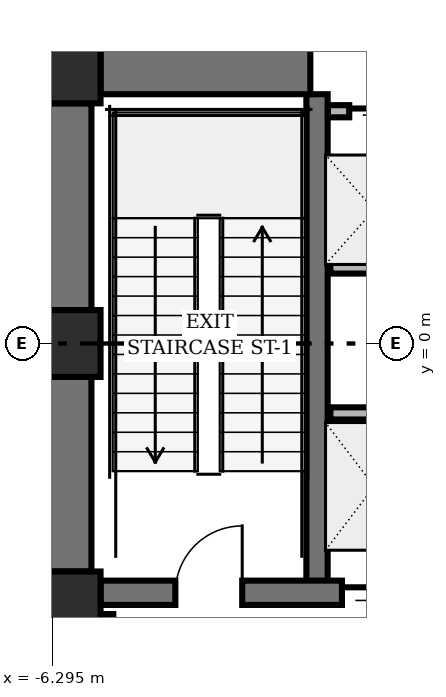
"""IFC4 building model, lengths in metres.
Left out: names, types, materials, properties, quantities, classifications, styles, units other than length and angle.
Written with IfcOpenShell. Run it as: python <this file> out.ifc"""

import sys

from ifc_helpers import new_model, si_unit, direction, frame, frame_2d, origin, origin_2d, place, context, subcontext, project, spatial, rectangle, hollow_rectangle, extrude, element, fill, save


model = new_model("IFC4")
c1 = context("Model", 3, precision=1e-05, world=origin(), true_north=direction((0.0, 1.0)))
c2 = subcontext(c1, "Body", "Model", "MODEL_VIEW")
j1 = project(units=[si_unit("LENGTHUNIT", "METRE"), si_unit("PLANEANGLEUNIT", "RADIAN")], contexts=[c1])
p1 = place(None, origin())
s1 = spatial("IfcSite", under=j1, at=p1, CompositionType="ELEMENT")
p2 = place(p1, origin())
s2 = spatial("IfcBuilding", under=s1, at=p2, CompositionType="ELEMENT")
p3 = place(p2, origin())
s3 = spatial("IfcBuildingStorey", under=s2, at=p3, CompositionType="ELEMENT", Elevation=0.0)
for number, where, z_axis, x_axis in (
    (1, (-6.05, 4.5, 0.0), (0.0, 0.0, 1.0), (1.0, 0.0, 0.0)),
    (2, (-6.05, 0.0, 0.0), (0.0, 0.0, 1.0), (1.0, 0.0, 0.0)),
    (3, (-6.05, -4.3, 0.0), (0.0, 0.0, 1.0), (1.0, 0.0, 0.0)),
):
    element("IfcColumn", number, at=place(p3, frame(where, z_axis=z_axis, x_axis=x_axis)), inside=s3, PredefinedType="COLUMN", context=c2, shape_type="SweptSolid", body=[
        extrude(hollow_rectangle(XDim=1.1, YDim=1.1, WallThickness=0.07, InnerFilletRadius=0.02, OuterFilletRadius=0.04, at=origin_2d()), origin(), (0.0, 0.0, 1.0), 4.8),
    ])
p4 = place(p3, frame((-6.05, 0.55, 0.0), z_axis=(0.0, 0.0, 1.0), x_axis=(0.0, 1.0, 0.0)))
e4 = element("IfcWall", 4, at=p4, inside=s3, PredefinedType="SHEAR", context=c2, shape_type="SweptSolid", body=[
    extrude(rectangle(XDim=3.4, YDim=0.8, at=frame_2d((1.7, 0.0))), origin(), (0.0, 0.0, 1.0), 4.498),
])
p5 = place(p3, frame((-6.05, -3.75, 0.0), z_axis=(0.0, 0.0, 1.0), x_axis=(0.0, 1.0, 0.0)))
e5 = element("IfcWall", 5, at=p5, inside=s3, PredefinedType="SHEAR", context=c2, shape_type="SweptSolid", body=[
    extrude(rectangle(XDim=3.2, YDim=0.8, at=frame_2d((1.6, 0.0))), origin(), (0.0, 0.0, 1.0), 4.498),
])
p6 = place(p3, frame((-1.94, -4.1, 0.0), z_axis=(0.0, 0.0, 1.0), x_axis=(0.0, 1.0, 0.0)))
e6 = element("IfcWall", 6, at=p6, inside=s3, PredefinedType="SHEAR", context=c2, shape_type="SweptSolid", body=[
    extrude(rectangle(XDim=8.2, YDim=0.35, at=frame_2d((4.1, 0.0))), origin(), (0.0, 0.0, 1.0), 4.498),
])
p7 = place(p3, frame((-5.5, -4.1, 0.0), z_axis=(0.0, 0.0, 1.0), x_axis=(1.0, 0.0, 0.0)))
e7 = element("IfcWall", 7, at=p7, inside=s3, PredefinedType="SHEAR", context=c2, shape_type="SweptSolid", body=[
    extrude(rectangle(XDim=11.0, YDim=0.4, at=frame_2d((5.5, 0.0))), origin(), (0.0, 0.0, 1.0), 4.498),
])
p8 = place(p7, frame((1.23, 0.0, 0.0)))
e8 = element("IfcOpeningElement", 8, at=p8, cuts=e7, PredefinedType="OPENING", context=c2, shape_type="SweptSolid", body=[
    extrude(rectangle(XDim=1.1, YDim=2.04, at=frame_2d((0.55, 1.02))), frame((0.0, 0.21, 0.0), z_axis=(0.0, -1.0, 0.0), x_axis=(1.0, 0.0, 0.0)), (0.0, 0.0, 1.0), 0.42),
])
p9 = place(p7, frame((8.67, 0.0, 0.0)))
e9 = element("IfcOpeningElement", 9, at=p9, cuts=e7, PredefinedType="OPENING", context=c2, shape_type="SweptSolid", body=[
    extrude(rectangle(XDim=1.1, YDim=2.04, at=frame_2d((0.55, 1.02))), frame((0.0, 0.21, 0.0), z_axis=(0.0, -1.0, 0.0), x_axis=(1.0, 0.0, 0.0)), (0.0, 0.0, 1.0), 0.42),
])
p10 = place(p7, frame((3.97, 0.0, 0.0)))
e10 = element("IfcOpeningElement", 10, at=p10, cuts=e7, PredefinedType="OPENING", context=c2, shape_type="SweptSolid", body=[
    extrude(rectangle(XDim=1.06, YDim=2.04, at=frame_2d((0.53, 1.02))), frame((0.0, 0.21, 0.0), z_axis=(0.0, -1.0, 0.0), x_axis=(1.0, 0.0, 0.0)), (0.0, 0.0, 1.0), 0.42),
])
p11 = place(p7, frame((5.97, 0.0, 0.0)))
e11 = element("IfcOpeningElement", 11, at=p11, cuts=e7, PredefinedType="OPENING", context=c2, shape_type="SweptSolid", body=[
    extrude(rectangle(XDim=1.06, YDim=2.04, at=frame_2d((0.53, 1.02))), frame((0.0, 0.21, 0.0), z_axis=(0.0, -1.0, 0.0), x_axis=(1.0, 0.0, 0.0)), (0.0, 0.0, 1.0), 0.42),
])
p12 = place(p3, frame((-5.5, 4.5, 0.0), z_axis=(0.0, 0.0, 1.0), x_axis=(1.0, 0.0, 0.0)))
e12 = element("IfcWall", 12, at=p12, inside=s3, PredefinedType="SHEAR", context=c2, shape_type="SweptSolid", body=[
    extrude(rectangle(XDim=3.45, YDim=0.8, at=frame_2d((1.725, 0.0))), origin(), (0.0, 0.0, 1.0), 4.498),
])
p13 = place(p3, frame((-1.72, -1.15, 0.0), z_axis=(0.0, 0.0, 1.0), x_axis=(1.0, 0.0, 0.0)))
e13 = element("IfcWall", 13, at=p13, inside=s3, PredefinedType="PARTITIONING", context=c2, shape_type="SweptSolid", body=[
    extrude(rectangle(XDim=3.44, YDim=0.2, at=frame_2d((1.72, 0.0))), origin(), (0.0, 0.0, 1.0), 4.473),
])
p14 = place(p3, frame((-5.4, -7.16, 0.0), z_axis=(0.0, 0.0, 1.0), x_axis=(0.0, 1.0, 0.0)))
e14 = element("IfcWall", 14, at=p14, inside=s3, PredefinedType="PARTITIONING", context=c2, shape_type="SweptSolid", body=[
    extrude(rectangle(XDim=2.71, YDim=0.22, at=frame_2d((1.355, 0.0))), origin(), (0.0, 0.0, 1.0), 4.473),
])
p15 = place(p3, frame((-1.72, 1.25, 0.0), z_axis=(0.0, 0.0, 1.0), x_axis=(1.0, 0.0, 0.0)))
e15 = element("IfcWall", 15, at=p15, inside=s3, PredefinedType="PARTITIONING", context=c2, shape_type="SweptSolid", body=[
    extrude(rectangle(XDim=3.44, YDim=0.2, at=frame_2d((1.72, 0.0))), origin(), (0.0, 0.0, 1.0), 4.473),
])
p16 = place(p3, frame((-1.76, 3.82, 0.0), z_axis=(0.0, 0.0, 1.0), x_axis=(1.0, 0.0, 0.0)))
e16 = element("IfcWall", 16, at=p16, inside=s3, PredefinedType="PARTITIONING", context=c2, shape_type="SweptSolid", body=[
    extrude(rectangle(XDim=3.52, YDim=0.2, at=frame_2d((1.76, 0.0))), origin(), (0.0, 0.0, 1.0), 4.473),
])
p17 = place(p16, frame((0.35, 0.0, 0.0)))
e17 = element("IfcOpeningElement", 17, at=p17, cuts=e16, PredefinedType="OPENING", context=c2, shape_type="SweptSolid", body=[
    extrude(rectangle(XDim=1.06, YDim=2.04, at=frame_2d((0.53, 1.02))), frame((0.0, 0.11, 0.0), z_axis=(0.0, -1.0, 0.0), x_axis=(1.0, 0.0, 0.0)), (0.0, 0.0, 1.0), 0.22),
])
p18 = place(p16, frame((2.11, 0.0, 0.0)))
e18 = element("IfcOpeningElement", 18, at=p18, cuts=e16, PredefinedType="OPENING", context=c2, shape_type="SweptSolid", body=[
    extrude(rectangle(XDim=1.06, YDim=2.04, at=frame_2d((0.53, 1.02))), frame((0.0, 0.11, 0.0), z_axis=(0.0, -1.0, 0.0), x_axis=(1.0, 0.0, 0.0)), (0.0, 0.0, 1.0), 0.22),
])
p19 = place(p8, origin())
e19 = element("IfcDoor", 19, at=p19, inside=s3, OperationType="SINGLE_SWING_RIGHT", PredefinedType="DOOR", context=c2, shape_type="SweptSolid", body=[
    extrude(rectangle(XDim=1.1, YDim=2.04, at=frame_2d((0.55, 1.02))), frame((0.0, 0.025, 0.0), z_axis=(0.0, -1.0, 0.0), x_axis=(1.0, 0.0, 0.0)), (0.0, 0.0, 1.0), 0.05),
])
fill(e8, e19)
p20 = place(p10, origin())
e20 = element("IfcDoor", 20, at=p20, inside=s3, OperationType="SLIDING_TO_LEFT", PredefinedType="DOOR", context=c2, shape_type="SweptSolid", body=[
    extrude(rectangle(XDim=1.06, YDim=2.04, at=frame_2d((0.53, 1.02))), frame((0.0, 0.025, 0.0), z_axis=(0.0, -1.0, 0.0), x_axis=(1.0, 0.0, 0.0)), (0.0, 0.0, 1.0), 0.05),
])
fill(e10, e20)
p21 = place(p17, origin())
e21 = element("IfcDoor", 21, at=p21, inside=s3, OperationType="SLIDING_TO_LEFT", PredefinedType="DOOR", context=c2, shape_type="SweptSolid", body=[
    extrude(rectangle(XDim=1.06, YDim=2.04, at=frame_2d((0.53, 1.02))), frame((0.0, 0.025, 0.0), z_axis=(0.0, -1.0, 0.0), x_axis=(1.0, 0.0, 0.0)), (0.0, 0.0, 1.0), 0.05),
])
fill(e17, e21)
save(model, sys.argv[1])
